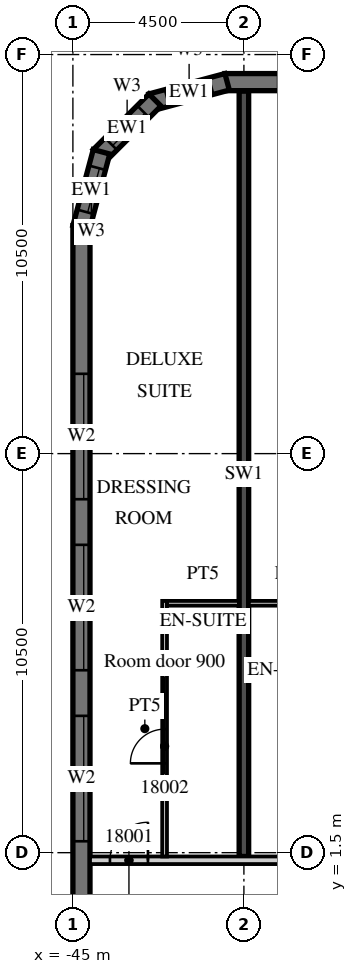
"""IFC4 building model, lengths in metres.
Left out: names, types, materials, properties, quantities, classifications, styles, units other than length and angle.
Written with IfcOpenShell. Run it as: python <this file> out.ifc"""

import sys

from ifc_helpers import new_model, si_unit, direction, frame, frame_2d, origin, place, context, subcontext, project, spatial, polyline, rectangle, outline, extrude, element, fill, save


model = new_model("IFC4")
c1 = context("Model", 3, precision=1e-05, world=origin(), true_north=direction((0.0, 1.0)))
c2 = subcontext(c1, "Body", "Model", "MODEL_VIEW")
j1 = project(units=[si_unit("LENGTHUNIT", "METRE"), si_unit("PLANEANGLEUNIT", "RADIAN")], contexts=[c1])
p1 = place(None, origin())
s1 = spatial("IfcSite", under=j1, at=p1, CompositionType="ELEMENT")
p2 = place(p1, origin())
s2 = spatial("IfcBuilding", under=s1, at=p2, CompositionType="ELEMENT")
p3 = place(p2, frame((0.0, 0.0, 89.7)))
s3 = spatial("IfcBuildingStorey", under=s2, at=p3, CompositionType="ELEMENT", Elevation=89.7)
p4 = place(p3, frame((-40.5, 1.4, 0.0), z_axis=(0.0, 0.0, 1.0), x_axis=(0.0, 1.0, 0.0)))
e1 = element("IfcWall", 1, at=p4, inside=s3, PredefinedType="SHEAR", context=c2, shape_type="SweptSolid", body=[
    extrude(rectangle(XDim=20.14, YDim=0.25, at=frame_2d((10.07, 0.0))), origin(), (0.0, 0.0, 1.0), 3.3),
])
p5 = place(p3, frame((13.5, 21.775, 0.0), z_axis=(0.0, 0.0, 1.0), x_axis=(-1.0, 0.0, 0.0)))
e2 = element("IfcWall", 2, at=p5, inside=s3, PredefinedType="SOLIDWALL", context=c2, shape_type="SweptSolid", body=[
    extrude(rectangle(XDim=54.5, YDim=0.45, at=frame_2d((27.25, 0.0))), origin(), (0.0, 0.0, 1.0), 3.02),
])
p6 = place(p5, frame((0.9, 0.0, 0.45)))
e3 = element("IfcOpeningElement", 3, at=p6, cuts=e2, PredefinedType="OPENING", context=c2, shape_type="SweptSolid", body=[
    extrude(rectangle(XDim=2.7, YDim=2.25, at=frame_2d((1.35, 1.125))), frame((0.0, 0.235, 0.0), z_axis=(0.0, -1.0, 0.0), x_axis=(1.0, 0.0, 0.0)), (0.0, 0.0, 1.0), 0.47),
])
p7 = place(p5, frame((5.4, 0.0, 0.45)))
e4 = element("IfcOpeningElement", 4, at=p7, cuts=e2, PredefinedType="OPENING", context=c2, shape_type="SweptSolid", body=[
    extrude(rectangle(XDim=2.7, YDim=2.25, at=frame_2d((1.35, 1.125))), frame((0.0, 0.235, 0.0), z_axis=(0.0, -1.0, 0.0), x_axis=(1.0, 0.0, 0.0)), (0.0, 0.0, 1.0), 0.47),
])
p8 = place(p5, frame((9.9, 0.0, 0.45)))
e5 = element("IfcOpeningElement", 5, at=p8, cuts=e2, PredefinedType="OPENING", context=c2, shape_type="SweptSolid", body=[
    extrude(rectangle(XDim=2.7, YDim=2.25, at=frame_2d((1.35, 1.125))), frame((0.0, 0.235, 0.0), z_axis=(0.0, -1.0, 0.0), x_axis=(1.0, 0.0, 0.0)), (0.0, 0.0, 1.0), 0.47),
])
p9 = place(p5, frame((14.4, 0.0, 0.45)))
e6 = element("IfcOpeningElement", 6, at=p9, cuts=e2, PredefinedType="OPENING", context=c2, shape_type="SweptSolid", body=[
    extrude(rectangle(XDim=2.7, YDim=2.25, at=frame_2d((1.35, 1.125))), frame((0.0, 0.235, 0.0), z_axis=(0.0, -1.0, 0.0), x_axis=(1.0, 0.0, 0.0)), (0.0, 0.0, 1.0), 0.47),
])
p10 = place(p5, frame((18.9, 0.0, 0.45)))
e7 = element("IfcOpeningElement", 7, at=p10, cuts=e2, PredefinedType="OPENING", context=c2, shape_type="SweptSolid", body=[
    extrude(rectangle(XDim=2.7, YDim=2.25, at=frame_2d((1.35, 1.125))), frame((0.0, 0.235, 0.0), z_axis=(0.0, -1.0, 0.0), x_axis=(1.0, 0.0, 0.0)), (0.0, 0.0, 1.0), 0.47),
])
p11 = place(p5, frame((23.4, 0.0, 0.45)))
e8 = element("IfcOpeningElement", 8, at=p11, cuts=e2, PredefinedType="OPENING", context=c2, shape_type="SweptSolid", body=[
    extrude(rectangle(XDim=2.7, YDim=2.25, at=frame_2d((1.35, 1.125))), frame((0.0, 0.235, 0.0), z_axis=(0.0, -1.0, 0.0), x_axis=(1.0, 0.0, 0.0)), (0.0, 0.0, 1.0), 0.47),
])
p12 = place(p5, frame((27.9, 0.0, 0.45)))
e9 = element("IfcOpeningElement", 9, at=p12, cuts=e2, PredefinedType="OPENING", context=c2, shape_type="SweptSolid", body=[
    extrude(rectangle(XDim=2.7, YDim=2.25, at=frame_2d((1.35, 1.125))), frame((0.0, 0.235, 0.0), z_axis=(0.0, -1.0, 0.0), x_axis=(1.0, 0.0, 0.0)), (0.0, 0.0, 1.0), 0.47),
])
p13 = place(p5, frame((32.4, 0.0, 0.45)))
e10 = element("IfcOpeningElement", 10, at=p13, cuts=e2, PredefinedType="OPENING", context=c2, shape_type="SweptSolid", body=[
    extrude(rectangle(XDim=2.7, YDim=2.25, at=frame_2d((1.35, 1.125))), frame((0.0, 0.235, 0.0), z_axis=(0.0, -1.0, 0.0), x_axis=(1.0, 0.0, 0.0)), (0.0, 0.0, 1.0), 0.47),
])
p14 = place(p5, frame((36.9, 0.0, 0.45)))
e11 = element("IfcOpeningElement", 11, at=p14, cuts=e2, PredefinedType="OPENING", context=c2, shape_type="SweptSolid", body=[
    extrude(rectangle(XDim=2.7, YDim=2.25, at=frame_2d((1.35, 1.125))), frame((0.0, 0.235, 0.0), z_axis=(0.0, -1.0, 0.0), x_axis=(1.0, 0.0, 0.0)), (0.0, 0.0, 1.0), 0.47),
])
p15 = place(p5, frame((41.4, 0.0, 0.45)))
e12 = element("IfcOpeningElement", 12, at=p15, cuts=e2, PredefinedType="OPENING", context=c2, shape_type="SweptSolid", body=[
    extrude(rectangle(XDim=2.7, YDim=2.25, at=frame_2d((1.35, 1.125))), frame((0.0, 0.235, 0.0), z_axis=(0.0, -1.0, 0.0), x_axis=(1.0, 0.0, 0.0)), (0.0, 0.0, 1.0), 0.47),
])
p16 = place(p5, frame((45.9, 0.0, 0.45)))
e13 = element("IfcOpeningElement", 13, at=p16, cuts=e2, PredefinedType="OPENING", context=c2, shape_type="SweptSolid", body=[
    extrude(rectangle(XDim=2.7, YDim=2.25, at=frame_2d((1.35, 1.125))), frame((0.0, 0.235, 0.0), z_axis=(0.0, -1.0, 0.0), x_axis=(1.0, 0.0, 0.0)), (0.0, 0.0, 1.0), 0.47),
])
p17 = place(p5, frame((50.4, 0.0, 0.45)))
e14 = element("IfcOpeningElement", 14, at=p17, cuts=e2, PredefinedType="OPENING", context=c2, shape_type="SweptSolid", body=[
    extrude(rectangle(XDim=2.7, YDim=2.25, at=frame_2d((1.35, 1.125))), frame((0.0, 0.235, 0.0), z_axis=(0.0, -1.0, 0.0), x_axis=(1.0, 0.0, 0.0)), (0.0, 0.0, 1.0), 0.47),
])
p18 = place(p3, frame((-40.942, 21.783, 0.0), z_axis=(0.0, 0.0, 1.0), x_axis=(-0.965926999034, -0.25881466832, 0.0)))
e15 = element("IfcWall", 15, at=p18, inside=s3, PredefinedType="SOLIDWALL", context=c2, shape_type="SweptSolid", body=[
    extrude(outline(polyline([(0.0, -0.225), (2.071, -0.225), (1.95, 0.225), (0.121, 0.225), (0.0, -0.225)])), origin(), (0.0, 0.0, 1.0), 3.02),
])
p19 = place(p18, frame((0.435, 0.0, 0.45)))
e16 = element("IfcOpeningElement", 16, at=p19, cuts=e15, PredefinedType="OPENING", context=c2, shape_type="SweptSolid", body=[
    extrude(rectangle(XDim=1.2, YDim=2.25, at=frame_2d((0.6, 1.125))), frame((0.0, 0.235, 0.0), z_axis=(0.0, -1.0, 0.0), x_axis=(1.0, 0.0, 0.0)), (0.0, 0.0, 1.0), 0.47),
])
p20 = place(p3, frame((-42.841, 21.305, 0.0), z_axis=(0.0, 0.0, 1.0), x_axis=(-0.707106781187, -0.707106781187, 0.0)))
e17 = element("IfcWall", 17, at=p20, inside=s3, PredefinedType="SOLIDWALL", context=c2, shape_type="SweptSolid", body=[
    extrude(outline(polyline([(0.0, -0.225), (2.071, -0.225), (1.95, 0.225), (0.121, 0.225), (0.0, -0.225)])), origin(), (0.0, 0.0, 1.0), 3.02),
])
p21 = place(p20, frame((0.435, 0.0, 0.45)))
e18 = element("IfcOpeningElement", 18, at=p21, cuts=e17, PredefinedType="OPENING", context=c2, shape_type="SweptSolid", body=[
    extrude(rectangle(XDim=1.2, YDim=2.25, at=frame_2d((0.6, 1.125))), frame((0.0, 0.235, 0.0), z_axis=(0.0, -1.0, 0.0), x_axis=(1.0, 0.0, 0.0)), (0.0, 0.0, 1.0), 0.47),
])
p22 = place(p3, frame((-44.247, 19.942, 0.0), z_axis=(0.0, 0.0, 1.0), x_axis=(-0.25881466832, -0.965926999034, 0.0)))
e19 = element("IfcWall", 19, at=p22, inside=s3, PredefinedType="SOLIDWALL", context=c2, shape_type="SweptSolid", body=[
    extrude(outline(polyline([(-0.0, -0.225), (2.07, -0.225), (1.95, 0.225), (0.12, 0.225), (-0.0, -0.225)])), origin(), (0.0, 0.0, 1.0), 3.02),
])
p23 = place(p22, frame((0.435, 0.0, 0.45)))
e20 = element("IfcOpeningElement", 20, at=p23, cuts=e19, PredefinedType="OPENING", context=c2, shape_type="SweptSolid", body=[
    extrude(rectangle(XDim=1.2, YDim=2.25, at=frame_2d((0.6, 1.125))), frame((0.0, 0.235, 0.0), z_axis=(0.0, -1.0, 0.0), x_axis=(1.0, 0.0, 0.0)), (0.0, 0.0, 1.0), 0.47),
])
p24 = place(p3, frame((-44.775, 18.0, 0.0), z_axis=(0.0, 0.0, 1.0), x_axis=(0.0, -1.0, 0.0)))
e21 = element("IfcWall", 21, at=p24, inside=s3, PredefinedType="SOLIDWALL", context=c2, shape_type="SweptSolid", body=[
    extrude(rectangle(XDim=36.0, YDim=0.45, at=frame_2d((18.0, 0.0))), origin(), (0.0, 0.0, 1.0), 3.02),
])
p25 = place(p24, frame((3.9, 0.0, 0.45)))
e22 = element("IfcOpeningElement", 22, at=p25, cuts=e21, PredefinedType="OPENING", context=c2, shape_type="SweptSolid", body=[
    extrude(rectangle(XDim=3.3, YDim=2.25, at=frame_2d((1.65, 1.125))), frame((0.0, 0.235, 0.0), z_axis=(0.0, -1.0, 0.0), x_axis=(1.0, 0.0, 0.0)), (0.0, 0.0, 1.0), 0.47),
])
p26 = place(p24, frame((8.4, 0.0, 0.45)))
e23 = element("IfcOpeningElement", 23, at=p26, cuts=e21, PredefinedType="OPENING", context=c2, shape_type="SweptSolid", body=[
    extrude(rectangle(XDim=3.3, YDim=2.25, at=frame_2d((1.65, 1.125))), frame((0.0, 0.235, 0.0), z_axis=(0.0, -1.0, 0.0), x_axis=(1.0, 0.0, 0.0)), (0.0, 0.0, 1.0), 0.47),
])
p27 = place(p24, frame((12.9, 0.0, 0.45)))
e24 = element("IfcOpeningElement", 24, at=p27, cuts=e21, PredefinedType="OPENING", context=c2, shape_type="SweptSolid", body=[
    extrude(rectangle(XDim=3.3, YDim=2.25, at=frame_2d((1.65, 1.125))), frame((0.0, 0.235, 0.0), z_axis=(0.0, -1.0, 0.0), x_axis=(1.0, 0.0, 0.0)), (0.0, 0.0, 1.0), 0.47),
])
p28 = place(p3, frame((-44.55, 1.3, 0.0), z_axis=(0.0, 0.0, 1.0), x_axis=(1.0, 0.0, 0.0)))
e25 = element("IfcWall", 25, at=p28, inside=s3, PredefinedType="PARTITIONING", context=c2, shape_type="SweptSolid", body=[
    extrude(rectangle(XDim=58.05, YDim=0.2, at=frame_2d((29.025, 0.0))), origin(), (0.0, 0.0, 1.0), 3.02),
])
p29 = place(p28, frame((0.525, 0.0, 0.0)))
e26 = element("IfcOpeningElement", 26, at=p29, cuts=e25, PredefinedType="OPENING", context=c2, shape_type="SweptSolid", body=[
    extrude(rectangle(XDim=1.0, YDim=2.1, at=frame_2d((0.5, 1.05))), frame((0.0, 0.11, 0.0), z_axis=(0.0, -1.0, 0.0), x_axis=(1.0, 0.0, 0.0)), (0.0, 0.0, 1.0), 0.22),
])
p30 = place(p28, frame((6.975, 0.0, 0.0)))
e27 = element("IfcOpeningElement", 27, at=p30, cuts=e25, PredefinedType="OPENING", context=c2, shape_type="SweptSolid", body=[
    extrude(rectangle(XDim=1.0, YDim=2.1, at=frame_2d((0.5, 1.05))), frame((0.0, 0.11, 0.0), z_axis=(0.0, -1.0, 0.0), x_axis=(1.0, 0.0, 0.0)), (0.0, 0.0, 1.0), 0.22),
])
p31 = place(p28, frame((11.5, 0.0, 0.0)))
e28 = element("IfcOpeningElement", 28, at=p31, cuts=e25, PredefinedType="OPENING", context=c2, shape_type="SweptSolid", body=[
    extrude(rectangle(XDim=1.0, YDim=2.1, at=frame_2d((0.5, 1.05))), frame((0.0, 0.11, 0.0), z_axis=(0.0, -1.0, 0.0), x_axis=(1.0, 0.0, 0.0)), (0.0, 0.0, 1.0), 0.22),
])
p32 = place(p28, frame((13.6, 0.0, 0.0)))
e29 = element("IfcOpeningElement", 29, at=p32, cuts=e25, PredefinedType="OPENING", context=c2, shape_type="SweptSolid", body=[
    extrude(rectangle(XDim=1.0, YDim=2.1, at=frame_2d((0.5, 1.05))), frame((0.0, 0.11, 0.0), z_axis=(0.0, -1.0, 0.0), x_axis=(1.0, 0.0, 0.0)), (0.0, 0.0, 1.0), 0.22),
])
p33 = place(p28, frame((22.912, 0.0, 0.0)))
e30 = element("IfcOpeningElement", 30, at=p33, cuts=e25, PredefinedType="OPENING", context=c2, shape_type="SweptSolid", body=[
    extrude(rectangle(XDim=1.2, YDim=2.1, at=frame_2d((0.6, 1.05))), frame((0.0, 0.11, 0.0), z_axis=(0.0, -1.0, 0.0), x_axis=(1.0, 0.0, 0.0)), (0.0, 0.0, 1.0), 0.22),
])
p34 = place(p28, frame((31.912, 0.0, 0.0)))
e31 = element("IfcOpeningElement", 31, at=p34, cuts=e25, PredefinedType="OPENING", context=c2, shape_type="SweptSolid", body=[
    extrude(rectangle(XDim=1.2, YDim=2.1, at=frame_2d((0.6, 1.05))), frame((0.0, 0.11, 0.0), z_axis=(0.0, -1.0, 0.0), x_axis=(1.0, 0.0, 0.0)), (0.0, 0.0, 1.0), 0.22),
])
p35 = place(p28, frame((37.987, 0.0, 0.0)))
e32 = element("IfcOpeningElement", 32, at=p35, cuts=e25, PredefinedType="OPENING", context=c2, shape_type="SweptSolid", body=[
    extrude(rectangle(XDim=1.2, YDim=2.1, at=frame_2d((0.6, 1.05))), frame((0.0, 0.11, 0.0), z_axis=(0.0, -1.0, 0.0), x_axis=(1.0, 0.0, 0.0)), (0.0, 0.0, 1.0), 0.22),
])
p36 = place(p28, frame((46.987, 0.0, 0.0)))
e33 = element("IfcOpeningElement", 33, at=p36, cuts=e25, PredefinedType="OPENING", context=c2, shape_type="SweptSolid", body=[
    extrude(rectangle(XDim=1.2, YDim=2.1, at=frame_2d((0.6, 1.05))), frame((0.0, 0.11, 0.0), z_axis=(0.0, -1.0, 0.0), x_axis=(1.0, 0.0, 0.0)), (0.0, 0.0, 1.0), 0.22),
])
p37 = place(p28, frame((54.125, 0.0, 0.0)))
e34 = element("IfcOpeningElement", 34, at=p37, cuts=e25, PredefinedType="OPENING", context=c2, shape_type="SweptSolid", body=[
    extrude(rectangle(XDim=1.0, YDim=2.1, at=frame_2d((0.5, 1.05))), frame((0.0, 0.11, 0.0), z_axis=(0.0, -1.0, 0.0), x_axis=(1.0, 0.0, 0.0)), (0.0, 0.0, 1.0), 0.22),
])
p38 = place(p3, frame((-42.587, 1.4, 0.0), z_axis=(0.0, 0.0, 1.0), x_axis=(0.0, 1.0, 0.0)))
e35 = element("IfcWall", 35, at=p38, inside=s3, PredefinedType="PARTITIONING", context=c2, shape_type="SweptSolid", body=[
    extrude(rectangle(XDim=6.725, YDim=0.125, at=frame_2d((3.363, 0.0))), origin(), (0.0, 0.0, 1.0), 3.02),
])
p39 = place(p38, frame((2.45, 0.0, 0.0)))
e36 = element("IfcOpeningElement", 36, at=p39, cuts=e35, PredefinedType="OPENING", context=c2, shape_type="SweptSolid", body=[
    extrude(rectangle(XDim=0.9, YDim=2.1, at=frame_2d((0.45, 1.05))), frame((0.0, 0.073, 0.0), z_axis=(0.0, -1.0, 0.0), x_axis=(1.0, 0.0, 0.0)), (0.0, 0.0, 1.0), 0.145),
])
p40 = place(p3, frame((-42.525, 8.062, 0.0), z_axis=(0.0, 0.0, 1.0), x_axis=(1.0, 0.0, 0.0)))
e37 = element("IfcWall", 37, at=p40, inside=s3, PredefinedType="PARTITIONING", context=c2, shape_type="SweptSolid", body=[
    extrude(rectangle(XDim=1.9, YDim=0.125, at=frame_2d((0.95, 0.0))), origin(), (0.0, 0.0, 1.0), 3.02),
])
p41 = place(p3, frame((-40.375, 8.062, 0.0), z_axis=(0.0, 0.0, 1.0), x_axis=(1.0, 0.0, 0.0)))
e38 = element("IfcWall", 38, at=p41, inside=s3, PredefinedType="PARTITIONING", context=c2, shape_type="SweptSolid", body=[
    extrude(rectangle(XDim=2.225, YDim=0.125, at=frame_2d((1.113, 0.0))), origin(), (0.0, 0.0, 1.0), 3.02),
])
p42 = place(p19, origin())
e39 = element("IfcWindow", 39, at=p42, inside=s3, PartitioningType="SINGLE_PANEL", PredefinedType="WINDOW", context=c2, shape_type="SweptSolid", body=[
    extrude(rectangle(XDim=1.2, YDim=2.25, at=frame_2d((0.6, 1.125))), frame((0.0, 0.09, 0.0), z_axis=(0.0, -1.0, 0.0), x_axis=(1.0, 0.0, 0.0)), (0.0, 0.0, 1.0), 0.06),
])
fill(e16, e39)
p43 = place(p21, origin())
e40 = element("IfcWindow", 40, at=p43, inside=s3, PartitioningType="SINGLE_PANEL", PredefinedType="WINDOW", context=c2, shape_type="SweptSolid", body=[
    extrude(rectangle(XDim=1.2, YDim=2.25, at=frame_2d((0.6, 1.125))), frame((0.0, 0.09, 0.0), z_axis=(0.0, -1.0, 0.0), x_axis=(1.0, 0.0, 0.0)), (0.0, 0.0, 1.0), 0.06),
])
fill(e18, e40)
p44 = place(p23, origin())
e41 = element("IfcWindow", 41, at=p44, inside=s3, PartitioningType="SINGLE_PANEL", PredefinedType="WINDOW", context=c2, shape_type="SweptSolid", body=[
    extrude(rectangle(XDim=1.2, YDim=2.25, at=frame_2d((0.6, 1.125))), frame((0.0, 0.09, 0.0), z_axis=(0.0, -1.0, 0.0), x_axis=(1.0, 0.0, 0.0)), (0.0, 0.0, 1.0), 0.06),
])
fill(e20, e41)
p45 = place(p25, origin())
e42 = element("IfcWindow", 42, at=p45, inside=s3, PartitioningType="SINGLE_PANEL", PredefinedType="WINDOW", context=c2, shape_type="SweptSolid", body=[
    extrude(rectangle(XDim=3.3, YDim=2.25, at=frame_2d((1.65, 1.125))), frame((0.0, 0.09, 0.0), z_axis=(0.0, -1.0, 0.0), x_axis=(1.0, 0.0, 0.0)), (0.0, 0.0, 1.0), 0.06),
])
fill(e22, e42)
p46 = place(p26, origin())
e43 = element("IfcWindow", 43, at=p46, inside=s3, PartitioningType="SINGLE_PANEL", PredefinedType="WINDOW", context=c2, shape_type="SweptSolid", body=[
    extrude(rectangle(XDim=3.3, YDim=2.25, at=frame_2d((1.65, 1.125))), frame((0.0, 0.09, 0.0), z_axis=(0.0, -1.0, 0.0), x_axis=(1.0, 0.0, 0.0)), (0.0, 0.0, 1.0), 0.06),
])
fill(e23, e43)
p47 = place(p27, origin())
e44 = element("IfcWindow", 44, at=p47, inside=s3, PartitioningType="SINGLE_PANEL", PredefinedType="WINDOW", context=c2, shape_type="SweptSolid", body=[
    extrude(rectangle(XDim=3.3, YDim=2.25, at=frame_2d((1.65, 1.125))), frame((0.0, 0.09, 0.0), z_axis=(0.0, -1.0, 0.0), x_axis=(1.0, 0.0, 0.0)), (0.0, 0.0, 1.0), 0.06),
])
fill(e24, e44)
p48 = place(p29, origin())
e45 = element("IfcDoor", 45, at=p48, inside=s3, OperationType="SINGLE_SWING_RIGHT", PredefinedType="DOOR", context=c2, shape_type="SweptSolid", body=[
    extrude(rectangle(XDim=1.0, YDim=2.1, at=frame_2d((0.5, 1.05))), frame((0.0, 0.025, 0.0), z_axis=(0.0, -1.0, 0.0), x_axis=(1.0, 0.0, 0.0)), (0.0, 0.0, 1.0), 0.05),
])
fill(e26, e45)
p49 = place(p39, origin())
e46 = element("IfcDoor", 46, at=p49, inside=s3, OperationType="SINGLE_SWING_LEFT", PredefinedType="DOOR", context=c2, shape_type="SweptSolid", body=[
    extrude(rectangle(XDim=0.9, YDim=2.1, at=frame_2d((0.45, 1.05))), frame((0.0, 0.025, 0.0), z_axis=(0.0, -1.0, 0.0), x_axis=(1.0, 0.0, 0.0)), (0.0, 0.0, 1.0), 0.05),
])
fill(e36, e46)
save(model, sys.argv[1])
